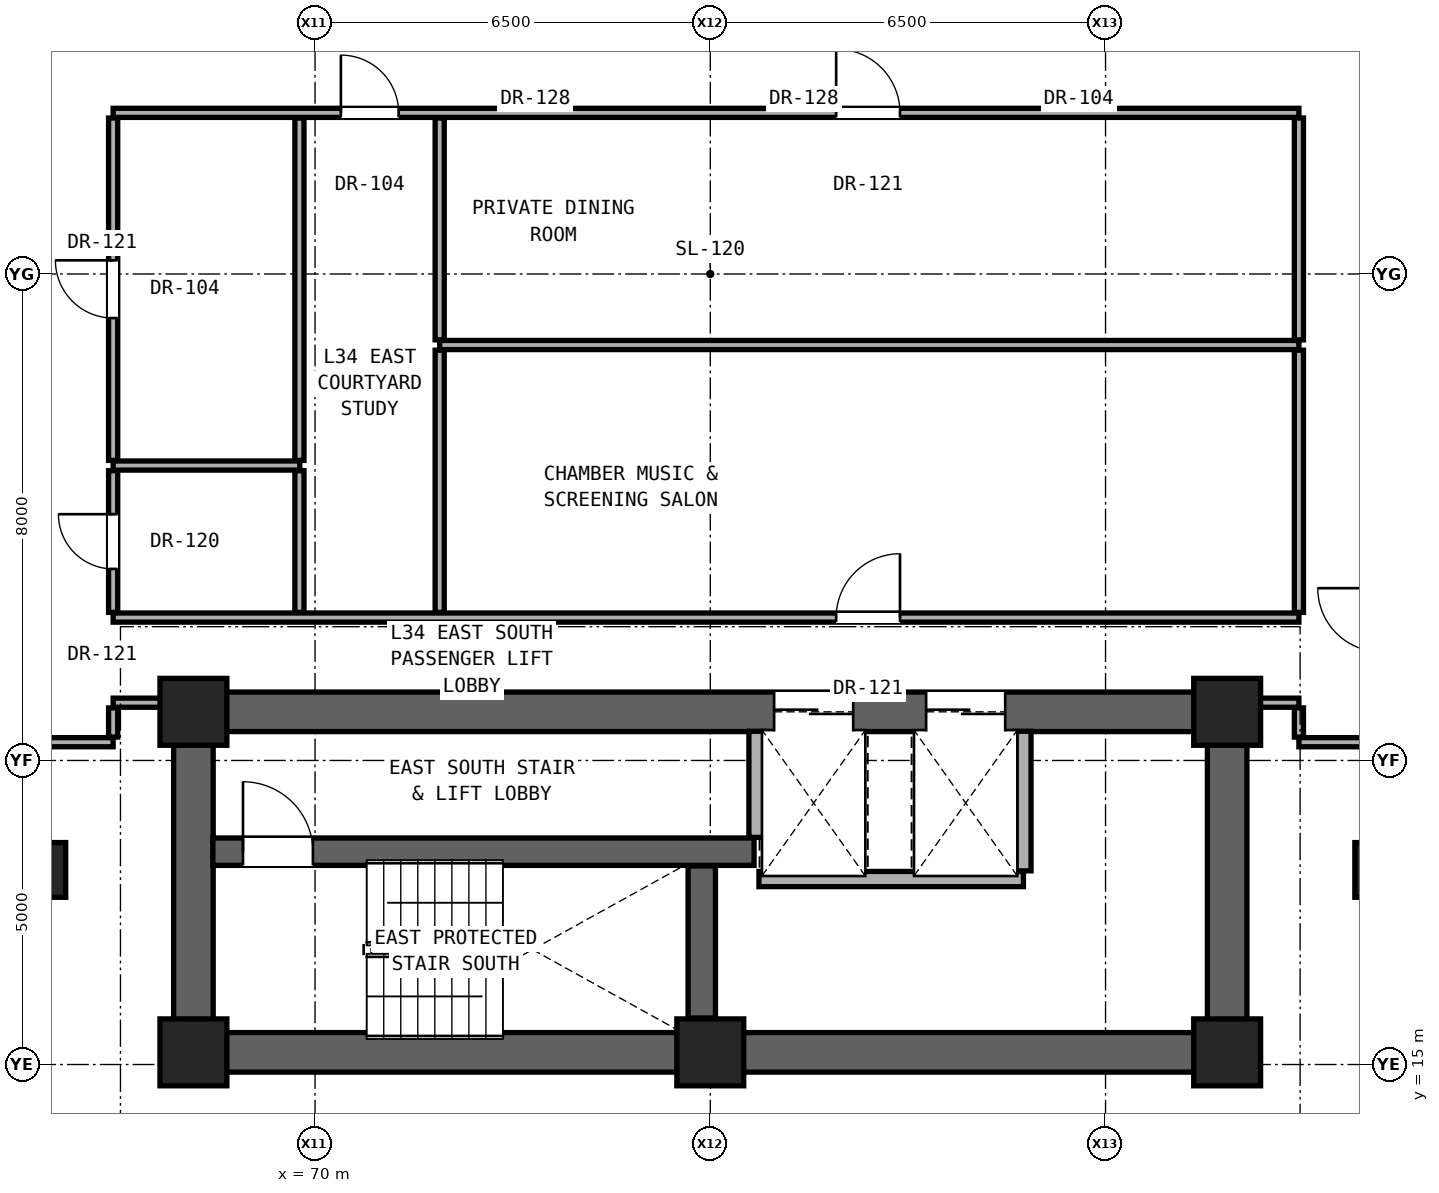
"""IFC4 building model, lengths in metres.
Left out: names, types, materials, properties, quantities, classifications, styles, units other than length and angle.
Written with IfcOpenShell. Run it as: python <this file> out.ifc"""

import sys

from ifc_helpers import new_model, si_unit, direction, frame, frame_2d, origin, origin_2d, place, context, subcontext, project, spatial, rectangle, extrude, element, fill, save


model = new_model("IFC4")
c1 = context("Model", 3, precision=1e-05, world=origin(), true_north=direction((0.0, 1.0)))
c2 = subcontext(c1, "Body", "Model", "MODEL_VIEW")
j1 = project(units=[si_unit("LENGTHUNIT", "METRE"), si_unit("PLANEANGLEUNIT", "RADIAN")], contexts=[c1])
p1 = place(None, origin())
s1 = spatial("IfcSite", under=j1, at=p1, CompositionType="ELEMENT")
p2 = place(p1, origin())
s2 = spatial("IfcBuilding", under=s1, at=p2, CompositionType="ELEMENT")
p3 = place(p2, frame((0.0, 0.0, 121.4)))
s3 = spatial("IfcBuildingStorey", under=s2, at=p3, CompositionType="ELEMENT", Elevation=121.4)
for number, where, z_axis, x_axis in (
    (1, (68.0, 15.2, 0.0), (0.0, 0.0, 1.0), (1.0, 0.0, 0.0)),
    (2, (76.5, 15.2, 0.0), (0.0, 0.0, 1.0), (1.0, 0.0, 0.0)),
    (3, (85.0, 15.2, 0.0), (0.0, 0.0, 1.0), (1.0, 0.0, 0.0)),
    (4, (68.0, 20.8, 0.0), (0.0, 0.0, 1.0), (1.0, 0.0, 0.0)),
    (5, (85.0, 20.8, 0.0), (0.0, 0.0, 1.0), (1.0, 0.0, 0.0)),
):
    element("IfcColumn", number, at=place(p3, frame(where, z_axis=z_axis, x_axis=x_axis)), inside=s3, PredefinedType="COLUMN", context=c2, shape_type="SweptSolid", body=[
        extrude(rectangle(XDim=1.1, YDim=1.1, at=origin_2d()), origin(), (0.0, 0.0, 1.0), 3.3),
    ])
for number, where, z_axis, x_axis in (
    (6, (65.6, 18.2, 0.0), (0.0, 0.0, 1.0), (1.0, 0.0, 0.0)),
    (7, (87.4, 18.2, 0.0), (0.0, 0.0, 1.0), (1.0, 0.0, 0.0)),
):
    element("IfcColumn", number, at=place(p3, frame(where, z_axis=z_axis, x_axis=x_axis)), inside=s3, PredefinedType="PILASTER", context=c2, shape_type="SweptSolid", body=[
        extrude(rectangle(XDim=0.6, YDim=0.9, at=origin_2d()), origin(), (0.0, 0.0, 1.0), 3.3),
    ])
p4 = place(p3, frame((68.0, 15.2, 0.0), z_axis=(0.0, 0.0, 1.0), x_axis=(1.0, 0.0, 0.0)))
e8 = element("IfcWall", 8, at=p4, inside=s3, PredefinedType="SHEAR", context=c2, shape_type="SweptSolid", body=[
    extrude(rectangle(XDim=17.0, YDim=0.65, at=frame_2d((8.5, 0.0))), origin(), (0.0, 0.0, 1.0), 3.08),
])
for number, where, z_axis, x_axis in (
    (9, (68.0, 15.2, 0.0), (0.0, 0.0, 1.0), (0.0, 1.0, 0.0)),
    (10, (85.0, 15.2, 0.0), (0.0, 0.0, 1.0), (0.0, 1.0, 0.0)),
):
    element("IfcWall", number, at=place(p3, frame(where, z_axis=z_axis, x_axis=x_axis)), inside=s3, PredefinedType="SHEAR", context=c2, shape_type="SweptSolid", body=[
        extrude(rectangle(XDim=5.6, YDim=0.65, at=frame_2d((2.8, 0.0))), origin(), (0.0, 0.0, 1.0), 3.08),
    ])
p5 = place(p3, frame((68.0, 20.8, 0.0), z_axis=(0.0, 0.0, 1.0), x_axis=(1.0, 0.0, 0.0)))
e11 = element("IfcWall", 11, at=p5, inside=s3, PredefinedType="SHEAR", context=c2, shape_type="SweptSolid", body=[
    extrude(rectangle(XDim=17.0, YDim=0.65, at=frame_2d((8.5, 0.0))), origin(), (0.0, 0.0, 1.0), 3.08),
])
p6 = place(p5, frame((9.55, 0.0, 0.0)))
e12 = element("IfcOpeningElement", 12, at=p6, cuts=e11, PredefinedType="OPENING", context=c2, shape_type="SweptSolid", body=[
    extrude(rectangle(XDim=1.3, YDim=2.3, at=frame_2d((0.65, 1.15))), frame((0.0, 0.335, 0.0), z_axis=(0.0, -1.0, 0.0), x_axis=(1.0, 0.0, 0.0)), (0.0, 0.0, 1.0), 0.67),
])
p7 = place(p5, frame((12.05, 0.0, 0.0)))
e13 = element("IfcOpeningElement", 13, at=p7, cuts=e11, PredefinedType="OPENING", context=c2, shape_type="SweptSolid", body=[
    extrude(rectangle(XDim=1.3, YDim=2.3, at=frame_2d((0.65, 1.15))), frame((0.0, 0.335, 0.0), z_axis=(0.0, -1.0, 0.0), x_axis=(1.0, 0.0, 0.0)), (0.0, 0.0, 1.0), 0.67),
])
p8 = place(p3, frame((77.3, 18.05, 0.0), z_axis=(0.0, 0.0, 1.0), x_axis=(1.0, 0.0, 0.0)))
e14 = element("IfcWall", 14, at=p8, inside=s3, PredefinedType="SOLIDWALL", context=c2, shape_type="SweptSolid", body=[
    extrude(rectangle(XDim=4.35, YDim=0.25, at=frame_2d((2.175, 0.0))), origin(), (0.0, 0.0, 1.0), 3.08),
])
p9 = place(p3, frame((68.32, 18.5, 0.0), z_axis=(0.0, 0.0, 1.0), x_axis=(1.0, 0.0, 0.0)))
e15 = element("IfcWall", 15, at=p9, inside=s3, PredefinedType="SHEAR", context=c2, shape_type="SweptSolid", body=[
    extrude(rectangle(XDim=8.9, YDim=0.45, at=frame_2d((4.45, 0.0))), origin(), (0.0, 0.0, 1.0), 3.08),
])
p10 = place(p9, frame((0.495, 0.0, 0.0)))
e16 = element("IfcOpeningElement", 16, at=p10, cuts=e15, PredefinedType="OPENING", context=c2, shape_type="SweptSolid", body=[
    extrude(rectangle(XDim=1.15, YDim=2.2, at=frame_2d((0.575, 1.1))), frame((0.0, 0.235, 0.0), z_axis=(0.0, -1.0, 0.0), x_axis=(1.0, 0.0, 0.0)), (0.0, 0.0, 1.0), 0.47),
])
p11 = place(p3, frame((65.32, 20.3, 0.0), z_axis=(0.0, 0.0, 1.0), x_axis=(1.0, 0.0, 0.0)))
e17 = element("IfcWall", 17, at=p11, inside=s3, PredefinedType="PARTITIONING", context=c2, shape_type="SweptSolid", body=[
    extrude(rectangle(XDim=1.36, YDim=0.15, at=frame_2d((0.68, 0.0))), origin(), (0.0, 0.0, 1.0), 3.08),
])
p12 = place(p3, frame((86.18, 20.3, 0.0), z_axis=(0.0, 0.0, 1.0), x_axis=(1.0, 0.0, 0.0)))
e18 = element("IfcWall", 18, at=p12, inside=s3, PredefinedType="PARTITIONING", context=c2, shape_type="SweptSolid", body=[
    extrude(rectangle(XDim=1.36, YDim=0.15, at=frame_2d((0.68, 0.0))), origin(), (0.0, 0.0, 1.0), 3.08),
])
p13 = place(p3, frame((66.68, 20.95, 0.0), z_axis=(0.0, 0.0, 1.0), x_axis=(1.0, 0.0, 0.0)))
e19 = element("IfcWall", 19, at=p13, inside=s3, PredefinedType="PARTITIONING", context=c2, shape_type="SweptSolid", body=[
    extrude(rectangle(XDim=1.0, YDim=0.15, at=frame_2d((0.5, 0.0))), origin(), (0.0, 0.0, 1.0), 2.472),
])
p14 = place(p3, frame((85.32, 20.95, 0.0), z_axis=(0.0, 0.0, 1.0), x_axis=(1.0, 0.0, 0.0)))
e20 = element("IfcWall", 20, at=p14, inside=s3, PredefinedType="PARTITIONING", context=c2, shape_type="SweptSolid", body=[
    extrude(rectangle(XDim=0.86, YDim=0.15, at=frame_2d((0.43, 0.0))), origin(), (0.0, 0.0, 1.0), 2.472),
])
p15 = place(p3, frame((66.68, 22.35, 0.0), z_axis=(0.0, 0.0, 1.0), x_axis=(1.0, 0.0, 0.0)))
e21 = element("IfcWall", 21, at=p15, inside=s3, PredefinedType="PARTITIONING", context=c2, shape_type="SweptSolid", body=[
    extrude(rectangle(XDim=19.5, YDim=0.15, at=frame_2d((9.75, 0.0))), origin(), (0.0, 0.0, 1.0), 2.216),
])
p16 = place(p15, frame((11.89, 0.0, 0.0)))
e22 = element("IfcOpeningElement", 22, at=p16, cuts=e21, PredefinedType="OPENING", context=c2, shape_type="SweptSolid", body=[
    extrude(rectangle(XDim=1.05, YDim=2.2, at=frame_2d((0.525, 1.1))), frame((0.0, 0.085, 0.0), z_axis=(0.0, -1.0, 0.0), x_axis=(1.0, 0.0, 0.0)), (0.0, 0.0, 1.0), 0.17),
])
p17 = place(p3, frame((66.68, 24.85, 0.0), z_axis=(0.0, 0.0, 1.0), x_axis=(1.0, 0.0, 0.0)))
e23 = element("IfcWall", 23, at=p17, inside=s3, PredefinedType="PARTITIONING", context=c2, shape_type="SweptSolid", body=[
    extrude(rectangle(XDim=3.07, YDim=0.15, at=frame_2d((1.535, 0.0))), origin(), (0.0, 0.0, 1.0), 2.216),
])
p18 = place(p3, frame((72.05, 26.832, 0.0), z_axis=(0.0, 0.0, 1.0), x_axis=(1.0, 0.0, 0.0)))
e24 = element("IfcWall", 24, at=p18, inside=s3, PredefinedType="PARTITIONING", context=c2, shape_type="SweptSolid", body=[
    extrude(rectangle(XDim=14.13, YDim=0.15, at=frame_2d((7.065, 0.0))), origin(), (0.0, 0.0, 1.0), 2.216),
])
p19 = place(p3, frame((66.68, 30.65, 0.0), z_axis=(0.0, 0.0, 1.0), x_axis=(1.0, 0.0, 0.0)))
e25 = element("IfcWall", 25, at=p19, inside=s3, PredefinedType="PARTITIONING", context=c2, shape_type="SweptSolid", body=[
    extrude(rectangle(XDim=19.5, YDim=0.15, at=frame_2d((9.75, 0.0))), origin(), (0.0, 0.0, 1.0), 2.216),
])
p20 = place(p19, frame((3.745, 0.0, 0.0)))
e26 = element("IfcOpeningElement", 26, at=p20, cuts=e25, PredefinedType="OPENING", context=c2, shape_type="SweptSolid", body=[
    extrude(rectangle(XDim=0.95, YDim=2.15, at=frame_2d((0.475, 1.075))), frame((0.0, 0.085, 0.0), z_axis=(0.0, -1.0, 0.0), x_axis=(1.0, 0.0, 0.0)), (0.0, 0.0, 1.0), 0.17),
])
p21 = place(p19, frame((11.89, 0.0, 0.0)))
e27 = element("IfcOpeningElement", 27, at=p21, cuts=e25, PredefinedType="OPENING", context=c2, shape_type="SweptSolid", body=[
    extrude(rectangle(XDim=1.05, YDim=2.2, at=frame_2d((0.525, 1.1))), frame((0.0, 0.085, 0.0), z_axis=(0.0, -1.0, 0.0), x_axis=(1.0, 0.0, 0.0)), (0.0, 0.0, 1.0), 0.17),
])
p22 = place(p3, frame((66.68, 20.385, 0.0), z_axis=(0.0, 0.0, 1.0), x_axis=(0.0, 1.0, 0.0)))
e28 = element("IfcWall", 28, at=p22, inside=s3, PredefinedType="PARTITIONING", context=c2, shape_type="SweptSolid", body=[
    extrude(rectangle(XDim=0.48, YDim=0.15, at=frame_2d((0.24, 0.0))), origin(), (0.0, 0.0, 1.0), 2.472),
])
p23 = place(p3, frame((66.68, 22.435, 0.0), z_axis=(0.0, 0.0, 1.0), x_axis=(0.0, 1.0, 0.0)))
e29 = element("IfcWall", 29, at=p23, inside=s3, PredefinedType="PARTITIONING", context=c2, shape_type="SweptSolid", body=[
    extrude(rectangle(XDim=2.33, YDim=0.15, at=frame_2d((1.165, 0.0))), origin(), (0.0, 0.0, 1.0), 3.08),
])
p24 = place(p23, frame((0.715, 0.0, 0.0)))
e30 = element("IfcOpeningElement", 30, at=p24, cuts=e29, PredefinedType="OPENING", context=c2, shape_type="SweptSolid", body=[
    extrude(rectangle(XDim=0.9, YDim=2.1, at=frame_2d((0.45, 1.05))), frame((0.0, 0.085, 0.0), z_axis=(0.0, -1.0, 0.0), x_axis=(1.0, 0.0, 0.0)), (0.0, 0.0, 1.0), 0.17),
])
p25 = place(p3, frame((66.68, 24.935, 0.0), z_axis=(0.0, 0.0, 1.0), x_axis=(0.0, 1.0, 0.0)))
e31 = element("IfcWall", 31, at=p25, inside=s3, PredefinedType="PARTITIONING", context=c2, shape_type="SweptSolid", body=[
    extrude(rectangle(XDim=5.63, YDim=0.15, at=frame_2d((2.815, 0.0))), origin(), (0.0, 0.0, 1.0), 2.376),
])
p26 = place(p25, frame((2.34, 0.0, 0.0)))
e32 = element("IfcOpeningElement", 32, at=p26, cuts=e31, PredefinedType="OPENING", context=c2, shape_type="SweptSolid", body=[
    extrude(rectangle(XDim=0.95, YDim=2.15, at=frame_2d((0.475, 1.075))), frame((0.0, 0.085, 0.0), z_axis=(0.0, -1.0, 0.0), x_axis=(1.0, 0.0, 0.0)), (0.0, 0.0, 1.0), 0.17),
])
p27 = place(p3, frame((69.743, 22.435, 0.0), z_axis=(0.0, 0.0, 1.0), x_axis=(0.0, 1.0, 0.0)))
e33 = element("IfcWall", 33, at=p27, inside=s3, PredefinedType="PARTITIONING", context=c2, shape_type="SweptSolid", body=[
    extrude(rectangle(XDim=2.33, YDim=0.15, at=frame_2d((1.165, 0.0))), origin(), (0.0, 0.0, 1.0), 3.08),
])
p28 = place(p3, frame((69.743, 24.935, 0.0), z_axis=(0.0, 0.0, 1.0), x_axis=(0.0, 1.0, 0.0)))
e34 = element("IfcWall", 34, at=p28, inside=s3, PredefinedType="PARTITIONING", context=c2, shape_type="SweptSolid", body=[
    extrude(rectangle(XDim=5.63, YDim=0.15, at=frame_2d((2.815, 0.0))), origin(), (0.0, 0.0, 1.0), 2.216),
])
p29 = place(p3, frame((72.05, 22.435, 0.0), z_axis=(0.0, 0.0, 1.0), x_axis=(0.0, 1.0, 0.0)))
e35 = element("IfcWall", 35, at=p29, inside=s3, PredefinedType="PARTITIONING", context=c2, shape_type="SweptSolid", body=[
    extrude(rectangle(XDim=4.312, YDim=0.15, at=frame_2d((2.156, 0.0))), origin(), (0.0, 0.0, 1.0), 3.08),
])
p30 = place(p3, frame((72.05, 26.917, 0.0), z_axis=(0.0, 0.0, 1.0), x_axis=(0.0, 1.0, 0.0)))
e36 = element("IfcWall", 36, at=p30, inside=s3, PredefinedType="PARTITIONING", context=c2, shape_type="SweptSolid", body=[
    extrude(rectangle(XDim=3.648, YDim=0.15, at=frame_2d((1.824, 0.0))), origin(), (0.0, 0.0, 1.0), 2.216),
])
p31 = place(p3, frame((76.36, 15.765, 0.0), z_axis=(0.0, 0.0, 1.0), x_axis=(0.0, 1.0, 0.0)))
e37 = element("IfcWall", 37, at=p31, inside=s3, PredefinedType="SHEAR", context=c2, shape_type="SweptSolid", body=[
    extrude(rectangle(XDim=2.5, YDim=0.45, at=frame_2d((1.25, 0.0))), origin(), (0.0, 0.0, 1.0), 3.08),
])
p32 = place(p3, frame((77.26, 18.735, 0.0), z_axis=(0.0, 0.0, 1.0), x_axis=(0.0, 1.0, 0.0)))
e38 = element("IfcWall", 38, at=p32, inside=s3, PredefinedType="SOLIDWALL", context=c2, shape_type="SweptSolid", body=[
    extrude(rectangle(XDim=1.745, YDim=0.25, at=frame_2d((0.873, 0.0))), origin(), (0.0, 0.0, 1.0), 3.08),
])
p33 = place(p3, frame((81.65, 18.185, 0.0), z_axis=(0.0, 0.0, 1.0), x_axis=(0.0, 1.0, 0.0)))
e39 = element("IfcWall", 39, at=p33, inside=s3, PredefinedType="SOLIDWALL", context=c2, shape_type="SweptSolid", body=[
    extrude(rectangle(XDim=2.295, YDim=0.25, at=frame_2d((1.147, 0.0))), origin(), (0.0, 0.0, 1.0), 3.08),
])
p34 = place(p3, frame((86.18, 20.385, 0.0), z_axis=(0.0, 0.0, 1.0), x_axis=(0.0, 1.0, 0.0)))
e40 = element("IfcWall", 40, at=p34, inside=s3, PredefinedType="PARTITIONING", context=c2, shape_type="SweptSolid", body=[
    extrude(rectangle(XDim=0.48, YDim=0.15, at=frame_2d((0.24, 0.0))), origin(), (0.0, 0.0, 1.0), 2.472),
])
p35 = place(p3, frame((86.18, 22.435, 0.0), z_axis=(0.0, 0.0, 1.0), x_axis=(0.0, 1.0, 0.0)))
e41 = element("IfcWall", 41, at=p35, inside=s3, PredefinedType="PARTITIONING", context=c2, shape_type="SweptSolid", body=[
    extrude(rectangle(XDim=4.312, YDim=0.15, at=frame_2d((2.156, 0.0))), origin(), (0.0, 0.0, 1.0), 3.08),
])
p36 = place(p3, frame((86.18, 26.917, 0.0), z_axis=(0.0, 0.0, 1.0), x_axis=(0.0, 1.0, 0.0)))
e42 = element("IfcWall", 42, at=p36, inside=s3, PredefinedType="PARTITIONING", context=c2, shape_type="SweptSolid", body=[
    extrude(rectangle(XDim=3.648, YDim=0.15, at=frame_2d((1.824, 0.0))), origin(), (0.0, 0.0, 1.0), 2.376),
])
p37 = place(p10, origin())
e43 = element("IfcDoor", 43, at=p37, inside=s3, OperationType="SINGLE_SWING_LEFT", PredefinedType="DOOR", context=c2, shape_type="SweptSolid", body=[
    extrude(rectangle(XDim=1.15, YDim=2.2, at=frame_2d((0.575, 1.1))), frame((0.0, 0.025, 0.0), z_axis=(0.0, -1.0, 0.0), x_axis=(1.0, 0.0, 0.0)), (0.0, 0.0, 1.0), 0.05),
])
fill(e16, e43)
p38 = place(p24, origin())
e44 = element("IfcDoor", 44, at=p38, inside=s3, OperationType="SINGLE_SWING_RIGHT", PredefinedType="DOOR", context=c2, shape_type="SweptSolid", body=[
    extrude(rectangle(XDim=0.9, YDim=2.1, at=frame_2d((0.45, 1.05))), frame((0.0, 0.025, 0.0), z_axis=(0.0, -1.0, 0.0), x_axis=(1.0, 0.0, 0.0)), (0.0, 0.0, 1.0), 0.05),
])
fill(e30, e44)
p39 = place(p26, origin())
e45 = element("IfcDoor", 45, at=p39, inside=s3, OperationType="SINGLE_SWING_RIGHT", PredefinedType="DOOR", context=c2, shape_type="SweptSolid", body=[
    extrude(rectangle(XDim=0.95, YDim=2.15, at=frame_2d((0.475, 1.075))), frame((0.0, 0.025, 0.0), z_axis=(0.0, -1.0, 0.0), x_axis=(1.0, 0.0, 0.0)), (0.0, 0.0, 1.0), 0.05),
])
fill(e32, e45)
p40 = place(p20, origin())
e46 = element("IfcDoor", 46, at=p40, inside=s3, OperationType="SINGLE_SWING_LEFT", PredefinedType="DOOR", context=c2, shape_type="SweptSolid", body=[
    extrude(rectangle(XDim=0.95, YDim=2.15, at=frame_2d((0.475, 1.075))), frame((0.0, 0.025, 0.0), z_axis=(0.0, -1.0, 0.0), x_axis=(1.0, 0.0, 0.0)), (0.0, 0.0, 1.0), 0.05),
])
fill(e26, e46)
p41 = place(p16, origin())
e47 = element("IfcDoor", 47, at=p41, inside=s3, OperationType="SINGLE_SWING_RIGHT", PredefinedType="DOOR", context=c2, shape_type="SweptSolid", body=[
    extrude(rectangle(XDim=1.05, YDim=2.2, at=frame_2d((0.525, 1.1))), frame((0.0, 0.025, 0.0), z_axis=(0.0, -1.0, 0.0), x_axis=(1.0, 0.0, 0.0)), (0.0, 0.0, 1.0), 0.05),
])
fill(e22, e47)
p42 = place(p21, origin())
e48 = element("IfcDoor", 48, at=p42, inside=s3, OperationType="SINGLE_SWING_LEFT", PredefinedType="DOOR", context=c2, shape_type="SweptSolid", body=[
    extrude(rectangle(XDim=1.05, YDim=2.2, at=frame_2d((0.525, 1.1))), frame((0.0, 0.025, 0.0), z_axis=(0.0, -1.0, 0.0), x_axis=(1.0, 0.0, 0.0)), (0.0, 0.0, 1.0), 0.05),
])
fill(e27, e48)
p43 = place(p6, origin())
e49 = element("IfcDoor", 49, at=p43, inside=s3, OperationType="DOUBLE_DOOR_SLIDING", PredefinedType="DOOR", context=c2, shape_type="SweptSolid", body=[
    extrude(rectangle(XDim=1.3, YDim=2.3, at=frame_2d((0.65, 1.15))), frame((0.0, 0.025, 0.0), z_axis=(0.0, -1.0, 0.0), x_axis=(1.0, 0.0, 0.0)), (0.0, 0.0, 1.0), 0.05),
])
fill(e12, e49)
p44 = place(p7, origin())
e50 = element("IfcDoor", 50, at=p44, inside=s3, OperationType="DOUBLE_DOOR_SLIDING", PredefinedType="DOOR", context=c2, shape_type="SweptSolid", body=[
    extrude(rectangle(XDim=1.3, YDim=2.3, at=frame_2d((0.65, 1.15))), frame((0.0, 0.025, 0.0), z_axis=(0.0, -1.0, 0.0), x_axis=(1.0, 0.0, 0.0)), (0.0, 0.0, 1.0), 0.05),
])
fill(e13, e50)
save(model, sys.argv[1])
